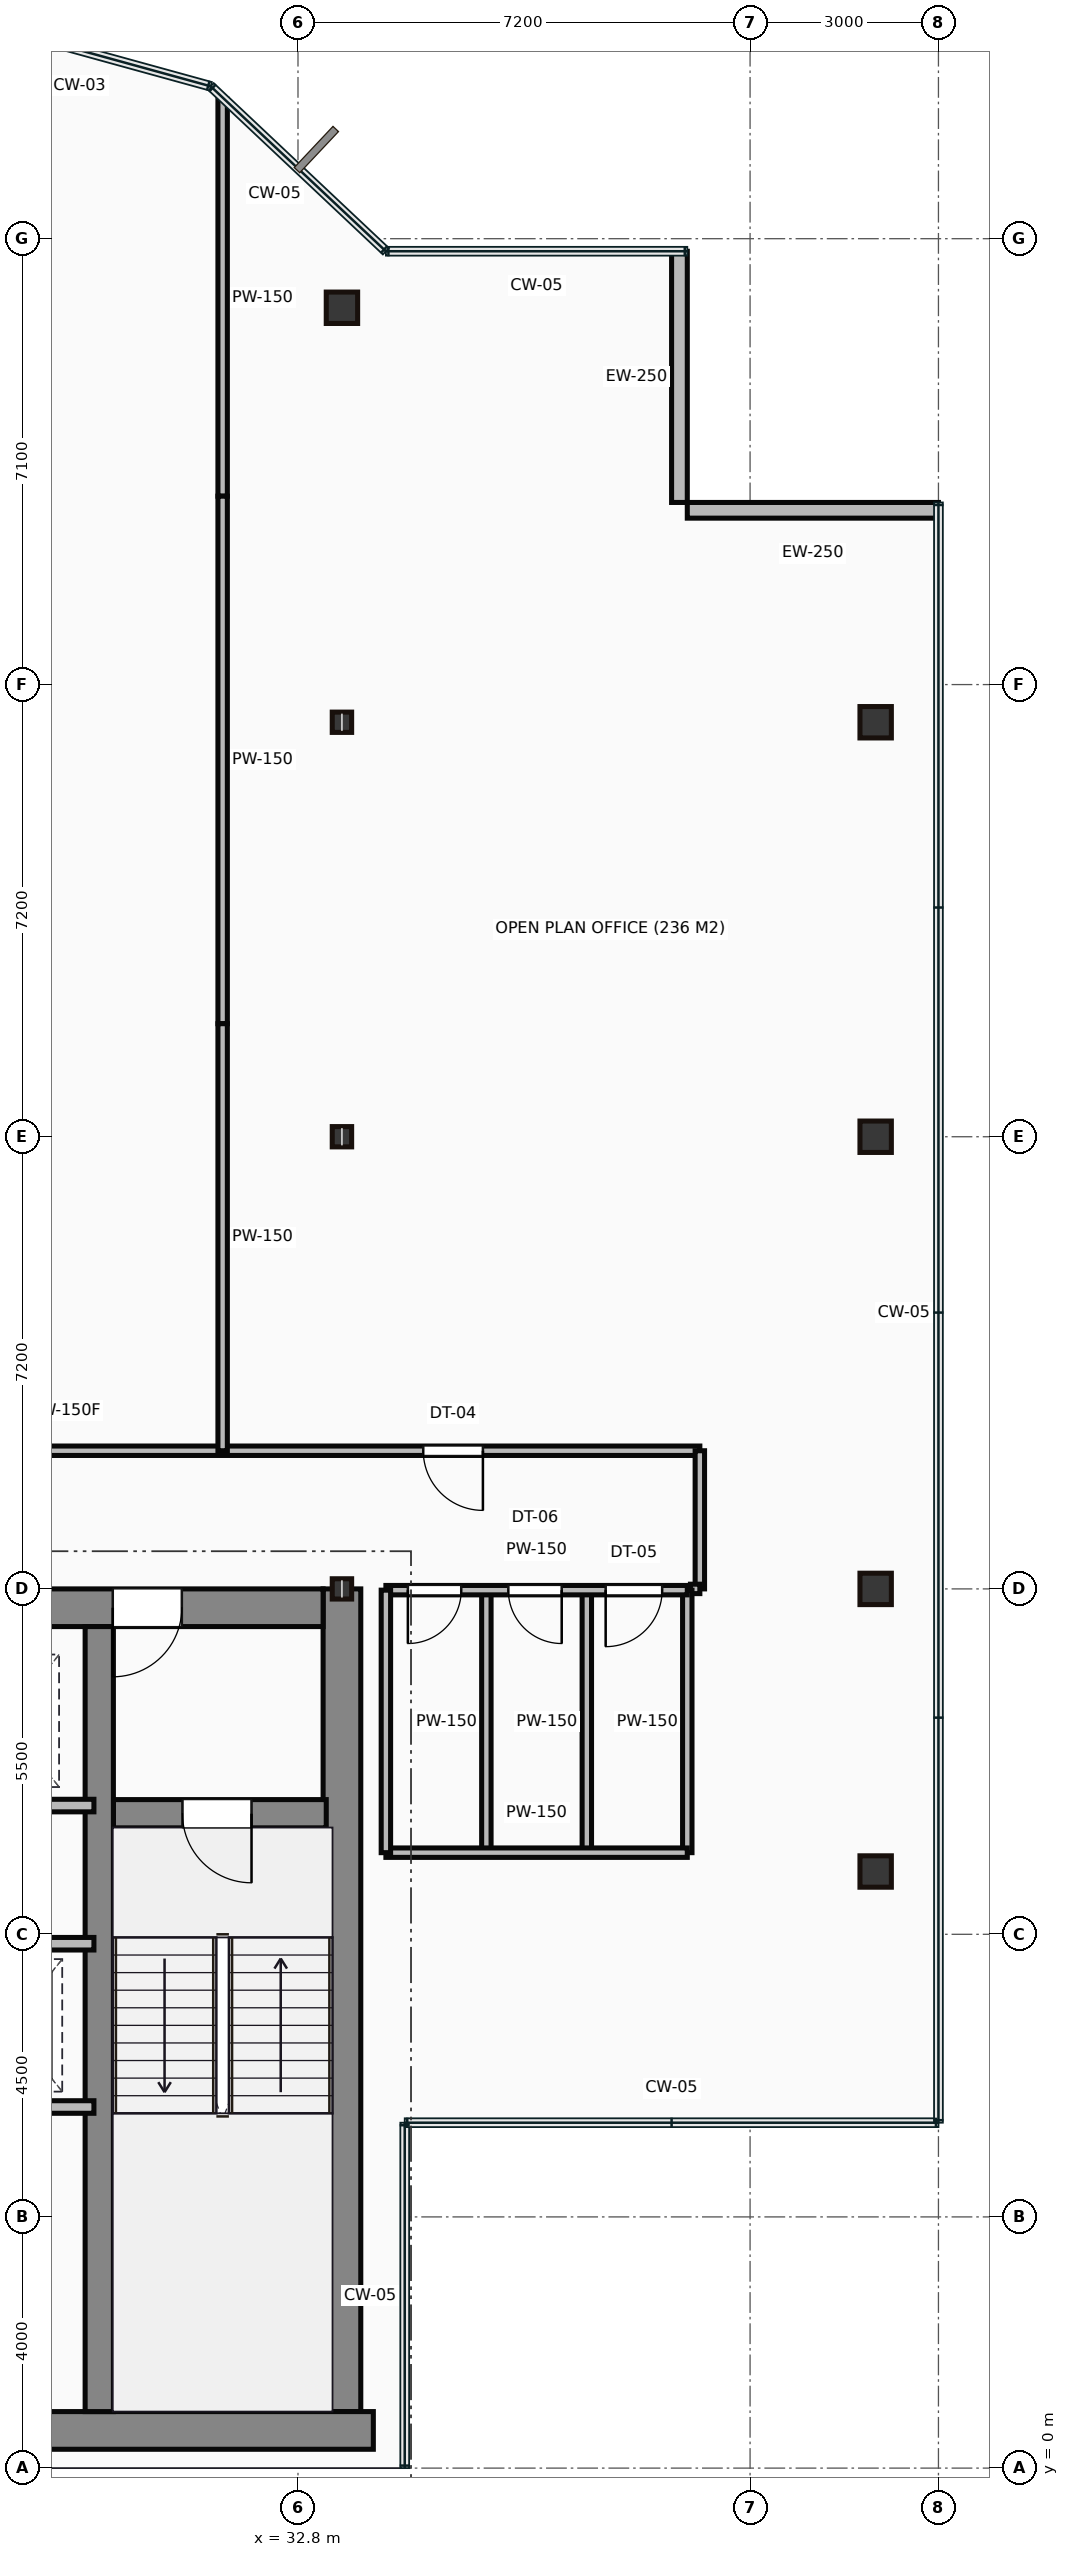
"""IFC4 building model, lengths in metres.
Left out: names, types, materials, properties, quantities, classifications, styles, units other than length and angle.
Written with IfcOpenShell. Run it as: python <this file> out.ifc"""

import sys

from ifc_helpers import new_model, si_unit, direction, frame, frame_2d, origin, origin_2d, place, context, subcontext, project, spatial, rectangle, hollow_rectangle, i_section, extrude, source, transform, mapped, element, fill, save


model = new_model("IFC4")
c1 = context("Model", 3, precision=1e-05, world=origin(), true_north=direction((0.0, 1.0)))
c2 = subcontext(c1, "Body", "Model", "MODEL_VIEW")
j1 = project(units=[si_unit("LENGTHUNIT", "METRE"), si_unit("PLANEANGLEUNIT", "RADIAN")], contexts=[c1])
p1 = place(None, origin())
s1 = spatial("IfcSite", under=j1, at=p1, CompositionType="ELEMENT")
p2 = place(p1, origin())
s2 = spatial("IfcBuilding", under=s1, at=p2, CompositionType="ELEMENT")
p3 = place(p2, frame((0.0, 0.0, 206.85)))
s3 = spatial("IfcBuildingStorey", under=s2, at=p3, CompositionType="ELEMENT", Elevation=206.85)
m1 = source(origin(), c2, "Body", "SweptSolid", [
    extrude(rectangle(XDim=29.5, YDim=0.6, at=frame_2d((14.75, 0.0))), origin(), (0.0, 0.0, 1.0), 3.65),
])
p4 = place(p3, frame((4.5, 0.6, 0.0), z_axis=(0.0, 0.0, 1.0), x_axis=(1.0, 0.0, 0.0)))
e1 = element("IfcWall", 1, at=p4, inside=s3, PredefinedType="SHEAR", context=c2, shape_type="MappedRepresentation", body=[
    mapped(m1, transform((0.0, 0.0, 0.0))),
])
m2 = source(origin(), c2, "Body", "SweptSolid", [
    extrude(rectangle(XDim=13.1, YDim=0.6, at=frame_2d((6.55, 0.0))), origin(), (0.0, 0.0, 1.0), 3.65),
])
p5 = place(p3, frame((33.5, 0.9, 0.0), z_axis=(0.0, 0.0, 1.0), x_axis=(0.0, 1.0, 0.0)))
e2 = element("IfcWall", 2, at=p5, inside=s3, PredefinedType="SHEAR", context=c2, shape_type="MappedRepresentation", body=[
    mapped(m2, transform((0.0, 0.0, 0.0))),
])
m3 = source(origin(), c2, "Body", "SweptSolid", [
    extrude(rectangle(XDim=12.6, YDim=0.6, at=frame_2d((6.3, 0.0))), origin(), (0.0, 0.0, 1.0), 3.65),
])
p6 = place(p3, frame((20.6, 13.7, 0.0), z_axis=(0.0, 0.0, 1.0), x_axis=(1.0, 0.0, 0.0)))
e3 = element("IfcWall", 3, at=p6, inside=s3, PredefinedType="SHEAR", context=c2, shape_type="MappedRepresentation", body=[
    mapped(m3, transform((0.0, 0.0, 0.0))),
])
p7 = place(p6, frame((9.25, 0.0, 0.0)))
e4 = element("IfcOpeningElement", 4, at=p7, cuts=e3, PredefinedType="OPENING", context=c2, shape_type="SweptSolid", body=[
    extrude(rectangle(XDim=1.1, YDim=2.15, at=frame_2d((0.55, 1.075))), frame((0.0, 0.31, 0.0), z_axis=(0.0, -1.0, 0.0), x_axis=(1.0, 0.0, 0.0)), (0.0, 0.0, 1.0), 0.62),
])
m4 = source(origin(), c2, "Body", "SweptSolid", [
    extrude(rectangle(XDim=12.5, YDim=0.45, at=frame_2d((6.25, 0.0))), origin(), (0.0, 0.0, 1.0), 3.65),
])
p8 = place(p3, frame((29.635, 0.9, 0.0), z_axis=(0.0, 0.0, 1.0), x_axis=(0.0, 1.0, 0.0)))
e5 = element("IfcWall", 5, at=p8, inside=s3, PredefinedType="SHEAR", context=c2, shape_type="MappedRepresentation", body=[
    mapped(m4, transform((0.0, 0.0, 0.0))),
])
m5 = source(origin(), c2, "Body", "SweptSolid", [
    extrude(rectangle(XDim=3.39, YDim=0.45, at=frame_2d((1.695, 0.0))), origin(), (0.0, 0.0, 1.0), 3.65),
])
p9 = place(p3, frame((29.86, 10.42, 0.0), z_axis=(0.0, 0.0, 1.0), x_axis=(1.0, 0.0, 0.0)))
e6 = element("IfcWall", 6, at=p9, inside=s3, PredefinedType="SHEAR", context=c2, shape_type="MappedRepresentation", body=[
    mapped(m5, transform((0.0, 0.0, 0.0))),
])
p10 = place(p9, frame((1.1, 0.0, 0.0)))
e7 = element("IfcOpeningElement", 7, at=p10, cuts=e6, PredefinedType="OPENING", context=c2, shape_type="SweptSolid", body=[
    extrude(rectangle(XDim=1.1, YDim=2.15, at=frame_2d((0.55, 1.075))), frame((0.0, 0.235, 0.0), z_axis=(0.0, -1.0, 0.0), x_axis=(1.0, 0.0, 0.0)), (0.0, 0.0, 1.0), 0.47),
])
m6 = source(origin(), c2, "Body", "SweptSolid", [
    extrude(i_section(OverallWidth=0.309, OverallDepth=0.323, WebThickness=0.014, FlangeThickness=0.023, at=origin_2d()), origin(), (0.0, 0.0, 1.0), 3.65),
])
for number, where, z_axis, x_axis in (
    (8, (33.5, 14.0, 0.0), (0.0, 0.0, 1.0), (1.0, 0.0, 0.0)),
    (9, (33.5, 21.2, 0.0), (0.0, 0.0, 1.0), (1.0, 0.0, 0.0)),
    (10, (33.5, 27.8, 0.0), (0.0, 0.0, 1.0), (1.0, 0.0, 0.0)),
):
    element("IfcColumn", number, at=place(p3, frame(where, z_axis=z_axis, x_axis=x_axis)), inside=s3, PredefinedType="COLUMN", context=c2, shape_type="MappedRepresentation", body=[
        mapped(m6, transform((0.0, 0.0, 0.0))),
    ])
m7 = source(origin(), c2, "Body", "SweptSolid", [
    extrude(hollow_rectangle(XDim=0.5, YDim=0.5, WallThickness=0.022, at=origin_2d()), origin(), (0.0, 0.0, 1.0), 3.65),
])
for number, where, z_axis, x_axis in (
    (11, (33.5, 34.4, 0.0), (0.0, 0.0, 1.0), (1.0, 0.0, 0.0)),
    (12, (42.0, 9.5, 0.0), (0.0, 0.0, 1.0), (1.0, 0.0, 0.0)),
    (13, (42.0, 14.0, 0.0), (0.0, 0.0, 1.0), (1.0, 0.0, 0.0)),
    (14, (42.0, 21.2, 0.0), (0.0, 0.0, 1.0), (1.0, 0.0, 0.0)),
    (15, (42.0, 27.8, 0.0), (0.0, 0.0, 1.0), (1.0, 0.0, 0.0)),
):
    element("IfcColumn", number, at=place(p3, frame(where, z_axis=z_axis, x_axis=x_axis)), inside=s3, PredefinedType="COLUMN", context=c2, shape_type="MappedRepresentation", body=[
        mapped(m7, transform((0.0, 0.0, 0.0))),
    ])
m8 = source(origin(), c2, "Body", "SweptSolid", [
    extrude(rectangle(XDim=4.0, YDim=0.25, at=frame_2d((2.0, 0.0))), origin(), (0.0, 0.0, 1.0), 3.4),
])
for number, where, z_axis, x_axis in (
    (16, (43.0, 31.175, 0.0), (0.0, 0.0, 1.0), (-1.0, 0.0, 0.0)),
    (17, (38.875, 31.3, 0.0), (0.0, 0.0, 1.0), (0.0, 1.0, 0.0)),
):
    element("IfcWall", number, at=place(p3, frame(where, z_axis=z_axis, x_axis=x_axis)), inside=s3, PredefinedType="STANDARD", context=c2, shape_type="MappedRepresentation", body=[
        mapped(m8, transform((0.0, 0.0, 0.0))),
    ])
m9 = source(origin(), c2, "Body", "SweptSolid", [
    extrude(rectangle(XDim=8.8, YDim=0.2, at=frame_2d((4.4, 0.0))), origin(), (0.0, 0.0, 1.0), 3.4),
])
p11 = place(p3, frame((20.75, 10.55, 0.0), z_axis=(0.0, 0.0, 1.0), x_axis=(1.0, 0.0, 0.0)))
e18 = element("IfcWall", 18, at=p11, inside=s3, PredefinedType="PARTITIONING", context=c2, shape_type="MappedRepresentation", body=[
    mapped(m9, transform((0.0, 0.0, 0.0))),
])
p12 = place(p11, frame((0.5, 0.0, 0.0)))
e19 = element("IfcOpeningElement", 19, at=p12, cuts=e18, PredefinedType="OPENING", context=c2, shape_type="SweptSolid", body=[
    extrude(rectangle(XDim=1.05, YDim=2.15, at=frame_2d((0.525, 1.075))), frame((0.0, 0.11, 0.0), z_axis=(0.0, -1.0, 0.0), x_axis=(1.0, 0.0, 0.0)), (0.0, 0.0, 1.0), 0.22),
])
p13 = place(p11, frame((2.6, 0.0, 0.0)))
e20 = element("IfcOpeningElement", 20, at=p13, cuts=e18, PredefinedType="OPENING", context=c2, shape_type="SweptSolid", body=[
    extrude(rectangle(XDim=1.05, YDim=2.15, at=frame_2d((0.525, 1.075))), frame((0.0, 0.11, 0.0), z_axis=(0.0, -1.0, 0.0), x_axis=(1.0, 0.0, 0.0)), (0.0, 0.0, 1.0), 0.22),
])
p14 = place(p11, frame((4.7, 0.0, 0.0)))
e21 = element("IfcOpeningElement", 21, at=p14, cuts=e18, PredefinedType="OPENING", context=c2, shape_type="SweptSolid", body=[
    extrude(rectangle(XDim=1.05, YDim=2.15, at=frame_2d((0.525, 1.075))), frame((0.0, 0.11, 0.0), z_axis=(0.0, -1.0, 0.0), x_axis=(1.0, 0.0, 0.0)), (0.0, 0.0, 1.0), 0.22),
])
p15 = place(p11, frame((6.8, 0.0, 0.0)))
e22 = element("IfcOpeningElement", 22, at=p15, cuts=e18, PredefinedType="OPENING", context=c2, shape_type="SweptSolid", body=[
    extrude(rectangle(XDim=1.05, YDim=2.15, at=frame_2d((0.525, 1.075))), frame((0.0, 0.11, 0.0), z_axis=(0.0, -1.0, 0.0), x_axis=(1.0, 0.0, 0.0)), (0.0, 0.0, 1.0), 0.22),
])
m10 = source(origin(), c2, "Body", "SweptSolid", [
    extrude(rectangle(XDim=4.55, YDim=0.2, at=frame_2d((2.275, 0.0))), origin(), (0.0, 0.0, 1.0), 3.4),
])
p16 = place(p3, frame((25.0, 8.35, 0.0), z_axis=(0.0, 0.0, 1.0), x_axis=(1.0, 0.0, 0.0)))
e23 = element("IfcWall", 23, at=p16, inside=s3, PredefinedType="PARTITIONING", context=c2, shape_type="MappedRepresentation", body=[
    mapped(m10, transform((0.0, 0.0, 0.0))),
])
p17 = place(p16, frame((0.5, 0.0, 0.0)))
e24 = element("IfcOpeningElement", 24, at=p17, cuts=e23, PredefinedType="OPENING", context=c2, shape_type="SweptSolid", body=[
    extrude(rectangle(XDim=1.05, YDim=2.15, at=frame_2d((0.525, 1.075))), frame((0.0, 0.11, 0.0), z_axis=(0.0, -1.0, 0.0), x_axis=(1.0, 0.0, 0.0)), (0.0, 0.0, 1.0), 0.22),
])
p18 = place(p16, frame((2.6, 0.0, 0.0)))
e25 = element("IfcOpeningElement", 25, at=p18, cuts=e23, PredefinedType="OPENING", context=c2, shape_type="SweptSolid", body=[
    extrude(rectangle(XDim=1.05, YDim=2.15, at=frame_2d((0.525, 1.075))), frame((0.0, 0.11, 0.0), z_axis=(0.0, -1.0, 0.0), x_axis=(1.0, 0.0, 0.0)), (0.0, 0.0, 1.0), 0.22),
])
p19 = place(p3, frame((25.0, 5.75, 0.0), z_axis=(0.0, 0.0, 1.0), x_axis=(1.0, 0.0, 0.0)))
e26 = element("IfcWall", 26, at=p19, inside=s3, PredefinedType="PARTITIONING", context=c2, shape_type="MappedRepresentation", body=[
    mapped(m10, transform((0.0, 0.0, 0.0))),
])
m11 = source(origin(), c2, "Body", "SweptSolid", [
    extrude(rectangle(XDim=4.8, YDim=0.15, at=frame_2d((2.4, 0.0))), origin(), (0.0, 0.0, 1.0), 2.787),
])
p20 = place(p3, frame((34.2, 13.98, 0.0), z_axis=(0.0, 0.0, 1.0), x_axis=(1.0, 0.0, 0.0)))
e27 = element("IfcWall", 27, at=p20, inside=s3, PredefinedType="PARTITIONING", context=c2, shape_type="MappedRepresentation", body=[
    mapped(m11, transform((0.0, 0.0, 0.0))),
])
p21 = place(p20, frame((0.35, 0.0, 0.0)))
e28 = element("IfcOpeningElement", 28, at=p21, cuts=e27, PredefinedType="OPENING", context=c2, shape_type="SweptSolid", body=[
    extrude(rectangle(XDim=0.85, YDim=2.1, at=frame_2d((0.425, 1.05))), frame((0.0, 0.085, 0.0), z_axis=(0.0, -1.0, 0.0), x_axis=(1.0, 0.0, 0.0)), (0.0, 0.0, 1.0), 0.17),
])
p22 = place(p20, frame((1.95, 0.0, 0.0)))
e29 = element("IfcOpeningElement", 29, at=p22, cuts=e27, PredefinedType="OPENING", context=c2, shape_type="SweptSolid", body=[
    extrude(rectangle(XDim=0.85, YDim=2.1, at=frame_2d((0.425, 1.05))), frame((0.0, 0.085, 0.0), z_axis=(0.0, -1.0, 0.0), x_axis=(1.0, 0.0, 0.0)), (0.0, 0.0, 1.0), 0.17),
])
p23 = place(p20, frame((3.5, 0.0, 0.0)))
e30 = element("IfcOpeningElement", 30, at=p23, cuts=e27, PredefinedType="OPENING", context=c2, shape_type="SweptSolid", body=[
    extrude(rectangle(XDim=0.9, YDim=2.1, at=frame_2d((0.45, 1.05))), frame((0.0, 0.085, 0.0), z_axis=(0.0, -1.0, 0.0), x_axis=(1.0, 0.0, 0.0)), (0.0, 0.0, 1.0), 0.17),
])
m12 = source(origin(), c2, "Body", "SweptSolid", [
    extrude(rectangle(XDim=4.8, YDim=0.15, at=frame_2d((2.4, 0.0))), origin(), (0.0, 0.0, 1.0), 3.4),
])
p24 = place(p3, frame((34.2, 9.8, 0.0), z_axis=(0.0, 0.0, 1.0), x_axis=(1.0, 0.0, 0.0)))
e31 = element("IfcWall", 31, at=p24, inside=s3, PredefinedType="PARTITIONING", context=c2, shape_type="MappedRepresentation", body=[
    mapped(m12, transform((0.0, 0.0, 0.0))),
])
m13 = source(origin(), c2, "Body", "SweptSolid", [
    extrude(rectangle(XDim=4.18, YDim=0.15, at=frame_2d((2.09, 0.0))), origin(), (0.0, 0.0, 1.0), 3.4),
])
for number, where, z_axis, x_axis in (
    (32, (39.0, 9.8, 0.0), (0.0, 0.0, 1.0), (0.0, 1.0, 0.0)),
    (33, (34.2, 9.8, 0.0), (0.0, 0.0, 1.0), (0.0, 1.0, 0.0)),
    (34, (35.8, 9.8, 0.0), (0.0, 0.0, 1.0), (0.0, 1.0, 0.0)),
    (35, (37.4, 9.8, 0.0), (0.0, 0.0, 1.0), (0.0, 1.0, 0.0)),
):
    element("IfcWall", number, at=place(p3, frame(where, z_axis=z_axis, x_axis=x_axis)), inside=s3, PredefinedType="PARTITIONING", context=c2, shape_type="MappedRepresentation", body=[
        mapped(m13, transform((0.0, 0.0, 0.0))),
    ])
m14 = source(origin(), c2, "Body", "SweptSolid", [
    extrude(rectangle(XDim=20.2, YDim=0.15, at=frame_2d((10.1, 0.0))), origin(), (0.0, 0.0, 1.0), 3.4),
])
p25 = place(p3, frame((19.0, 16.2, 0.0), z_axis=(0.0, 0.0, 1.0), x_axis=(1.0, 0.0, 0.0)))
e36 = element("IfcWall", 36, at=p25, inside=s3, PredefinedType="PARTITIONING", context=c2, shape_type="MappedRepresentation", body=[
    mapped(m14, transform((0.0, 0.0, 0.0))),
])
p26 = place(p25, frame((5.955, 0.0, 0.0)))
e37 = element("IfcOpeningElement", 37, at=p26, cuts=e36, PredefinedType="OPENING", context=c2, shape_type="SweptSolid", body=[
    extrude(rectangle(XDim=0.95, YDim=2.15, at=frame_2d((0.475, 1.075))), frame((0.0, 0.085, 0.0), z_axis=(0.0, -1.0, 0.0), x_axis=(1.0, 0.0, 0.0)), (0.0, 0.0, 1.0), 0.17),
])
p27 = place(p25, frame((15.795, 0.0, 0.0)))
e38 = element("IfcOpeningElement", 38, at=p27, cuts=e36, PredefinedType="OPENING", context=c2, shape_type="SweptSolid", body=[
    extrude(rectangle(XDim=0.95, YDim=2.15, at=frame_2d((0.475, 1.075))), frame((0.0, 0.085, 0.0), z_axis=(0.0, -1.0, 0.0), x_axis=(1.0, 0.0, 0.0)), (0.0, 0.0, 1.0), 0.17),
])
m15 = source(origin(), c2, "Body", "SweptSolid", [
    extrude(rectangle(XDim=2.2, YDim=0.15, at=frame_2d((1.1, 0.0))), origin(), (0.0, 0.0, 1.0), 3.4),
])
p28 = place(p3, frame((39.2, 16.2, 0.0), z_axis=(0.0, 0.0, 1.0), x_axis=(0.0, -1.0, 0.0)))
e39 = element("IfcWall", 39, at=p28, inside=s3, PredefinedType="PARTITIONING", context=c2, shape_type="MappedRepresentation", body=[
    mapped(m15, transform((0.0, 0.0, 0.0))),
])
m16 = source(origin(), c2, "Body", "SweptSolid", [
    extrude(rectangle(XDim=0.15, YDim=0.15, at=frame_2d((0.075, 0.0))), origin(), (0.0, 0.0, 1.0), 3.4),
])
p29 = place(p3, frame((39.2, 14.0, 0.0), z_axis=(0.0, 0.0, 1.0), x_axis=(-1.0, 0.0, 0.0)))
e40 = element("IfcWall", 40, at=p29, inside=s3, PredefinedType="PARTITIONING", context=c2, shape_type="MappedRepresentation", body=[
    mapped(m16, transform((0.0, 0.0, 0.0))),
])
m17 = source(origin(), c2, "Body", "SweptSolid", [
    extrude(rectangle(XDim=6.32, YDim=0.15, at=frame_2d((3.16, 0.0))), origin(), (0.0, 0.0, 1.0), 3.4),
])
p30 = place(p3, frame((31.6, 37.72, 0.0), z_axis=(0.0, 0.0, 1.0), x_axis=(0.0, -1.0, 0.0)))
e41 = element("IfcWall", 41, at=p30, inside=s3, PredefinedType="PARTITIONING", context=c2, shape_type="MappedRepresentation", body=[
    mapped(m17, transform((0.0, 0.0, 0.0))),
])
m18 = source(origin(), c2, "Body", "SweptSolid", [
    extrude(rectangle(XDim=8.4, YDim=0.15, at=frame_2d((4.2, 0.0))), origin(), (0.0, 0.0, 1.0), 3.4),
])
p31 = place(p3, frame((31.6, 31.4, 0.0), z_axis=(0.0, 0.0, 1.0), x_axis=(0.0, -1.0, 0.0)))
e42 = element("IfcWall", 42, at=p31, inside=s3, PredefinedType="PARTITIONING", context=c2, shape_type="MappedRepresentation", body=[
    mapped(m18, transform((0.0, 0.0, 0.0))),
])
m19 = source(origin(), c2, "Body", "SweptSolid", [
    extrude(rectangle(XDim=6.8, YDim=0.15, at=frame_2d((3.4, 0.0))), origin(), (0.0, 0.0, 1.0), 3.4),
])
p32 = place(p3, frame((31.6, 23.0, 0.0), z_axis=(0.0, 0.0, 1.0), x_axis=(0.0, -1.0, 0.0)))
e43 = element("IfcWall", 43, at=p32, inside=s3, PredefinedType="PARTITIONING", context=c2, shape_type="MappedRepresentation", body=[
    mapped(m19, transform((0.0, 0.0, 0.0))),
])
m20 = source(origin(), c2, "Body", "SweptSolid", [
    extrude(rectangle(XDim=1.1, YDim=2.15, at=frame_2d((0.55, 1.075))), frame((0.0, 0.025, 0.0), z_axis=(0.0, -1.0, 0.0), x_axis=(1.0, 0.0, 0.0)), (0.0, 0.0, 1.0), 0.05),
])
p33 = place(p10, frame((1.1, 0.0, 0.0), z_axis=(0.0, 0.0, 1.0), x_axis=(-1.0, 0.0, 0.0)))
e44 = element("IfcDoor", 44, at=p33, inside=s3, OperationType="SINGLE_SWING_RIGHT", PredefinedType="DOOR", context=c2, shape_type="MappedRepresentation", body=[
    mapped(m20, transform((0.0, 0.0, 0.0))),
])
fill(e7, e44)
p34 = place(p7, origin())
e45 = element("IfcDoor", 45, at=p34, inside=s3, OperationType="SINGLE_SWING_LEFT", PredefinedType="DOOR", context=c2, shape_type="MappedRepresentation", body=[
    mapped(m20, transform((0.0, 0.0, 0.0))),
])
fill(e4, e45)
m21 = source(origin(), c2, "Body", "SweptSolid", [
    extrude(rectangle(XDim=0.85, YDim=2.1, at=frame_2d((0.425, 1.05))), frame((0.0, 0.025, 0.0), z_axis=(0.0, -1.0, 0.0), x_axis=(1.0, 0.0, 0.0)), (0.0, 0.0, 1.0), 0.05),
])
p35 = place(p21, frame((0.85, 0.0, 0.0), z_axis=(0.0, 0.0, 1.0), x_axis=(-1.0, 0.0, 0.0)))
e46 = element("IfcDoor", 46, at=p35, inside=s3, OperationType="SINGLE_SWING_LEFT", PredefinedType="DOOR", context=c2, shape_type="MappedRepresentation", body=[
    mapped(m21, transform((0.0, 0.0, 0.0))),
])
fill(e28, e46)
p36 = place(p22, frame((0.85, 0.0, 0.0), z_axis=(0.0, 0.0, 1.0), x_axis=(-1.0, 0.0, 0.0)))
e47 = element("IfcDoor", 47, at=p36, inside=s3, OperationType="SINGLE_SWING_RIGHT", PredefinedType="DOOR", context=c2, shape_type="MappedRepresentation", body=[
    mapped(m21, transform((0.0, 0.0, 0.0))),
])
fill(e29, e47)
m22 = source(origin(), c2, "Body", "SweptSolid", [
    extrude(rectangle(XDim=0.9, YDim=2.1, at=frame_2d((0.45, 1.05))), frame((0.0, 0.025, 0.0), z_axis=(0.0, -1.0, 0.0), x_axis=(1.0, 0.0, 0.0)), (0.0, 0.0, 1.0), 0.05),
])
p37 = place(p23, frame((0.9, 0.0, 0.0), z_axis=(0.0, 0.0, 1.0), x_axis=(-1.0, 0.0, 0.0)))
e48 = element("IfcDoor", 48, at=p37, inside=s3, OperationType="SINGLE_SWING_LEFT", PredefinedType="DOOR", context=c2, shape_type="MappedRepresentation", body=[
    mapped(m22, transform((0.0, 0.0, 0.0))),
])
fill(e30, e48)
m23 = source(origin(), c2, "Body", "SweptSolid", [
    extrude(rectangle(XDim=0.95, YDim=2.15, at=frame_2d((0.475, 1.075))), frame((0.0, 0.025, 0.0), z_axis=(0.0, -1.0, 0.0), x_axis=(1.0, 0.0, 0.0)), (0.0, 0.0, 1.0), 0.05),
])
p38 = place(p27, origin())
e49 = element("IfcDoor", 49, at=p38, inside=s3, OperationType="SINGLE_SWING_RIGHT", PredefinedType="DOOR", context=c2, shape_type="MappedRepresentation", body=[
    mapped(m23, transform((0.0, 0.0, 0.0))),
])
fill(e38, e49)
save(model, sys.argv[1])
